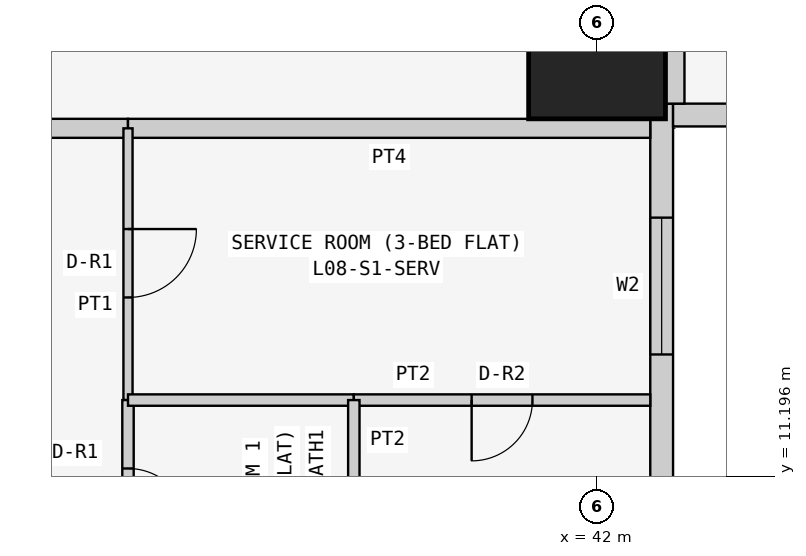
"""IFC4 building model, lengths in metres.
Left out: names, types, materials, properties, quantities, classifications, styles, units other than length and angle.
Written with IfcOpenShell. Run it as: python <this file> out.ifc"""

import sys

from ifc_helpers import new_model, si_unit, direction, frame, frame_2d, origin, origin_2d, place, context, subcontext, project, spatial, rectangle, extrude, element, fill, save


model = new_model("IFC4")
c1 = context("Model", 3, precision=1e-05, world=origin(), true_north=direction((0.0, 1.0)))
c2 = subcontext(c1, "Body", "Model", "MODEL_VIEW")
j1 = project(units=[si_unit("LENGTHUNIT", "METRE"), si_unit("PLANEANGLEUNIT", "RADIAN")], contexts=[c1])
p1 = place(None, origin())
s1 = spatial("IfcSite", under=j1, at=p1, CompositionType="ELEMENT")
p2 = place(p1, origin())
s2 = spatial("IfcBuilding", under=s1, at=p2, CompositionType="ELEMENT")
p3 = place(p2, frame((0.0, 0.0, 38.1)))
s3 = spatial("IfcBuildingStorey", under=s2, at=p3, CompositionType="ELEMENT", Elevation=38.1)
p4 = place(p3, frame((42.0, 16.8, 0.0), z_axis=(0.0, 0.0, 1.0), x_axis=(1.0, 0.0, 0.0)))
e1 = element("IfcColumn", 1, at=p4, inside=s3, PredefinedType="COLUMN", context=c2, shape_type="SweptSolid", body=[
    extrude(rectangle(XDim=1.8, YDim=1.8, at=origin_2d()), origin(), (0.0, 0.0, 1.0), 3.6),
])
p5 = place(p3, frame((42.85, 0.4, 0.0), z_axis=(0.0, 0.0, 1.0), x_axis=(0.0, 1.0, 0.0)))
e2 = element("IfcWall", 2, at=p5, inside=s3, PredefinedType="SOLIDWALL", context=c2, shape_type="SweptSolid", body=[
    extrude(rectangle(XDim=15.7, YDim=0.3, at=frame_2d((7.85, 0.0))), origin(), (0.0, 0.0, 1.0), 3.45),
])
p6 = place(p5, frame((12.4, 0.0, 0.9)))
e3 = element("IfcOpeningElement", 3, at=p6, cuts=e2, PredefinedType="OPENING", context=c2, shape_type="SweptSolid", body=[
    extrude(rectangle(XDim=1.8, YDim=1.5, at=frame_2d((0.9, 0.75))), frame((0.0, 0.16, 0.0), z_axis=(0.0, -1.0, 0.0), x_axis=(1.0, 0.0, 0.0)), (0.0, 0.0, 1.0), 0.32),
])
p7 = place(p5, frame((9.55, 0.0, 1.5)))
e4 = element("IfcOpeningElement", 4, at=p7, cuts=e2, PredefinedType="OPENING", context=c2, shape_type="SweptSolid", body=[
    extrude(rectangle(XDim=0.9, YDim=0.7, at=frame_2d((0.45, 0.35))), frame((0.0, 0.16, 0.0), z_axis=(0.0, -1.0, 0.0), x_axis=(1.0, 0.0, 0.0)), (0.0, 0.0, 1.0), 0.32),
])
p8 = place(p5, frame((5.1, 0.0, 0.9)))
e5 = element("IfcOpeningElement", 5, at=p8, cuts=e2, PredefinedType="OPENING", context=c2, shape_type="SweptSolid", body=[
    extrude(rectangle(XDim=1.8, YDim=1.5, at=frame_2d((0.9, 0.75))), frame((0.0, 0.16, 0.0), z_axis=(0.0, -1.0, 0.0), x_axis=(1.0, 0.0, 0.0)), (0.0, 0.0, 1.0), 0.32),
])
p9 = place(p5, frame((2.0, 0.0, 0.0)))
e6 = element("IfcOpeningElement", 6, at=p9, cuts=e2, PredefinedType="OPENING", context=c2, shape_type="SweptSolid", body=[
    extrude(rectangle(XDim=0.9, YDim=2.4, at=frame_2d((0.45, 1.2))), frame((0.0, 0.16, 0.0), z_axis=(0.0, -1.0, 0.0), x_axis=(1.0, 0.0, 0.0)), (0.0, 0.0, 1.0), 0.32),
])
p10 = place(p5, frame((0.7, 0.0, 0.9)))
e7 = element("IfcOpeningElement", 7, at=p10, cuts=e2, PredefinedType="OPENING", context=c2, shape_type="SweptSolid", body=[
    extrude(rectangle(XDim=1.2, YDim=1.5, at=frame_2d((0.6, 0.75))), frame((0.0, 0.16, 0.0), z_axis=(0.0, -1.0, 0.0), x_axis=(1.0, 0.0, 0.0)), (0.0, 0.0, 1.0), 0.32),
])
p11 = place(p3, frame((43.0, 15.95, 0.0), z_axis=(0.0, 0.0, 1.0), x_axis=(1.0, 0.0, 0.0)))
e8 = element("IfcWall", 8, at=p11, inside=s3, PredefinedType="SOLIDWALL", context=c2, shape_type="SweptSolid", body=[
    extrude(rectangle(XDim=15.4, YDim=0.3, at=frame_2d((7.7, 0.0))), origin(), (0.0, 0.0, 1.0), 3.45),
])
p12 = place(p11, frame((1.2, 0.0, 0.9)))
e9 = element("IfcOpeningElement", 9, at=p12, cuts=e8, PredefinedType="OPENING", context=c2, shape_type="SweptSolid", body=[
    extrude(rectangle(XDim=1.8, YDim=1.5, at=frame_2d((0.9, 0.75))), frame((0.0, 0.16, 0.0), z_axis=(0.0, -1.0, 0.0), x_axis=(1.0, 0.0, 0.0)), (0.0, 0.0, 1.0), 0.32),
])
p13 = place(p11, frame((4.95, 0.0, 1.5)))
e10 = element("IfcOpeningElement", 10, at=p13, cuts=e8, PredefinedType="OPENING", context=c2, shape_type="SweptSolid", body=[
    extrude(rectangle(XDim=0.9, YDim=0.7, at=frame_2d((0.45, 0.35))), frame((0.0, 0.16, 0.0), z_axis=(0.0, -1.0, 0.0), x_axis=(1.0, 0.0, 0.0)), (0.0, 0.0, 1.0), 0.32),
])
p14 = place(p11, frame((8.5, 0.0, 0.9)))
e11 = element("IfcOpeningElement", 11, at=p14, cuts=e8, PredefinedType="OPENING", context=c2, shape_type="SweptSolid", body=[
    extrude(rectangle(XDim=1.8, YDim=1.5, at=frame_2d((0.9, 0.75))), frame((0.0, 0.16, 0.0), z_axis=(0.0, -1.0, 0.0), x_axis=(1.0, 0.0, 0.0)), (0.0, 0.0, 1.0), 0.32),
])
p15 = place(p11, frame((12.5, 0.0, 0.0)))
e12 = element("IfcOpeningElement", 12, at=p15, cuts=e8, PredefinedType="OPENING", context=c2, shape_type="SweptSolid", body=[
    extrude(rectangle(XDim=0.9, YDim=2.4, at=frame_2d((0.45, 1.2))), frame((0.0, 0.16, 0.0), z_axis=(0.0, -1.0, 0.0), x_axis=(1.0, 0.0, 0.0)), (0.0, 0.0, 1.0), 0.32),
])
p16 = place(p11, frame((13.5, 0.0, 0.9)))
e13 = element("IfcOpeningElement", 13, at=p16, cuts=e8, PredefinedType="OPENING", context=c2, shape_type="SweptSolid", body=[
    extrude(rectangle(XDim=1.2, YDim=1.5, at=frame_2d((0.6, 0.75))), frame((0.0, 0.16, 0.0), z_axis=(0.0, -1.0, 0.0), x_axis=(1.0, 0.0, 0.0)), (0.0, 0.0, 1.0), 0.32),
])
p17 = place(p3, frame((43.025, 22.971, 0.0), z_axis=(0.0, 0.0, 1.0), x_axis=(0.0, -1.0, 0.0)))
e14 = element("IfcWall", 14, at=p17, inside=s3, PredefinedType="PARTITIONING", context=c2, shape_type="SweptSolid", body=[
    extrude(rectangle(XDim=6.871, YDim=0.25, at=frame_2d((3.436, 0.0))), origin(), (0.0, 0.0, 1.0), 3.45),
])
p18 = place(p3, frame((35.829, 15.775, 0.0), z_axis=(0.0, 0.0, 1.0), x_axis=(-1.0, 0.0, 0.0)))
e15 = element("IfcWall", 15, at=p18, inside=s3, PredefinedType="PARTITIONING", context=c2, shape_type="SweptSolid", body=[
    extrude(rectangle(XDim=1.2, YDim=0.25, at=frame_2d((0.6, 0.0))), origin(), (0.0, 0.0, 1.0), 3.45),
])
p19 = place(p3, frame((42.7, 15.775, 0.0), z_axis=(0.0, 0.0, 1.0), x_axis=(-1.0, 0.0, 0.0)))
e16 = element("IfcWall", 16, at=p19, inside=s3, PredefinedType="PARTITIONING", context=c2, shape_type="SweptSolid", body=[
    extrude(rectangle(XDim=6.871, YDim=0.25, at=frame_2d((3.436, 0.0))), origin(), (0.0, 0.0, 1.0), 3.45),
])
p20 = place(p3, frame((35.829, 12.2, 0.0), z_axis=(0.0, 0.0, 1.0), x_axis=(0.0, 1.0, 0.0)))
e17 = element("IfcWall", 17, at=p20, inside=s3, PredefinedType="PARTITIONING", context=c2, shape_type="SweptSolid", body=[
    extrude(rectangle(XDim=3.575, YDim=0.12, at=frame_2d((1.788, 0.0))), origin(), (0.0, 0.0, 1.0), 3.45),
])
p21 = place(p20, frame((1.35, 0.0, 0.0)))
e18 = element("IfcOpeningElement", 18, at=p21, cuts=e17, PredefinedType="OPENING", context=c2, shape_type="SweptSolid", body=[
    extrude(rectangle(XDim=0.9, YDim=2.1, at=frame_2d((0.45, 1.05))), frame((0.0, 0.07, 0.0), z_axis=(0.0, -1.0, 0.0), x_axis=(1.0, 0.0, 0.0)), (0.0, 0.0, 1.0), 0.14),
])
p22 = place(p3, frame((35.829, 9.6, 0.0), z_axis=(0.0, 0.0, 1.0), x_axis=(0.0, 1.0, 0.0)))
e19 = element("IfcWall", 19, at=p22, inside=s3, PredefinedType="PARTITIONING", context=c2, shape_type="SweptSolid", body=[
    extrude(rectangle(XDim=2.6, YDim=0.15, at=frame_2d((1.3, 0.0))), origin(), (0.0, 0.0, 1.0), 3.45),
])
p23 = place(p22, frame((0.9, 0.0, 0.0)))
e20 = element("IfcOpeningElement", 20, at=p23, cuts=e19, PredefinedType="OPENING", context=c2, shape_type="SweptSolid", body=[
    extrude(rectangle(XDim=0.8, YDim=2.1, at=frame_2d((0.4, 1.05))), frame((0.0, 0.085, 0.0), z_axis=(0.0, -1.0, 0.0), x_axis=(1.0, 0.0, 0.0)), (0.0, 0.0, 1.0), 0.17),
])
p24 = place(p3, frame((35.829, 12.2, 0.0), z_axis=(0.0, 0.0, 1.0), x_axis=(1.0, 0.0, 0.0)))
e21 = element("IfcWall", 21, at=p24, inside=s3, PredefinedType="PARTITIONING", context=c2, shape_type="SweptSolid", body=[
    extrude(rectangle(XDim=2.971, YDim=0.15, at=frame_2d((1.485, 0.0))), origin(), (0.0, 0.0, 1.0), 3.45),
])
p25 = place(p3, frame((38.8, 12.2, 0.0), z_axis=(0.0, 0.0, 1.0), x_axis=(1.0, 0.0, 0.0)))
e22 = element("IfcWall", 22, at=p25, inside=s3, PredefinedType="PARTITIONING", context=c2, shape_type="SweptSolid", body=[
    extrude(rectangle(XDim=3.9, YDim=0.15, at=frame_2d((1.95, 0.0))), origin(), (0.0, 0.0, 1.0), 3.45),
])
p26 = place(p25, frame((1.55, 0.0, 0.0)))
e23 = element("IfcOpeningElement", 23, at=p26, cuts=e22, PredefinedType="OPENING", context=c2, shape_type="SweptSolid", body=[
    extrude(rectangle(XDim=0.8, YDim=2.1, at=frame_2d((0.4, 1.05))), frame((0.0, 0.085, 0.0), z_axis=(0.0, -1.0, 0.0), x_axis=(1.0, 0.0, 0.0)), (0.0, 0.0, 1.0), 0.17),
])
p27 = place(p3, frame((38.8, 9.6, 0.0), z_axis=(0.0, 0.0, 1.0), x_axis=(0.0, 1.0, 0.0)))
e24 = element("IfcWall", 24, at=p27, inside=s3, PredefinedType="PARTITIONING", context=c2, shape_type="SweptSolid", body=[
    extrude(rectangle(XDim=2.6, YDim=0.15, at=frame_2d((1.3, 0.0))), origin(), (0.0, 0.0, 1.0), 3.45),
])
p28 = place(p6, origin())
e25 = element("IfcWindow", 25, at=p28, inside=s3, PartitioningType="SINGLE_PANEL", PredefinedType="WINDOW", context=c2, shape_type="SweptSolid", body=[
    extrude(rectangle(XDim=1.8, YDim=1.5, at=frame_2d((0.9, 0.75))), frame((0.0, 0.03, 0.0), z_axis=(0.0, -1.0, 0.0), x_axis=(1.0, 0.0, 0.0)), (0.0, 0.0, 1.0), 0.06),
])
fill(e3, e25)
p29 = place(p21, frame((0.9, 0.0, 0.0), z_axis=(0.0, 0.0, 1.0), x_axis=(-1.0, 0.0, 0.0)))
e26 = element("IfcDoor", 26, at=p29, inside=s3, OperationType="SINGLE_SWING_LEFT", PredefinedType="DOOR", context=c2, shape_type="SweptSolid", body=[
    extrude(rectangle(XDim=0.9, YDim=2.1, at=frame_2d((0.45, 1.05))), frame((0.0, 0.025, 0.0), z_axis=(0.0, -1.0, 0.0), x_axis=(1.0, 0.0, 0.0)), (0.0, 0.0, 1.0), 0.05),
])
fill(e18, e26)
p30 = place(p26, frame((0.8, 0.0, 0.0), z_axis=(0.0, 0.0, 1.0), x_axis=(-1.0, 0.0, 0.0)))
e27 = element("IfcDoor", 27, at=p30, inside=s3, OperationType="SINGLE_SWING_RIGHT", PredefinedType="DOOR", context=c2, shape_type="SweptSolid", body=[
    extrude(rectangle(XDim=0.8, YDim=2.1, at=frame_2d((0.4, 1.05))), frame((0.0, 0.025, 0.0), z_axis=(0.0, -1.0, 0.0), x_axis=(1.0, 0.0, 0.0)), (0.0, 0.0, 1.0), 0.05),
])
fill(e23, e27)
p31 = place(p23, frame((0.8, 0.0, 0.0), z_axis=(0.0, 0.0, 1.0), x_axis=(-1.0, 0.0, 0.0)))
e28 = element("IfcDoor", 28, at=p31, inside=s3, OperationType="SINGLE_SWING_RIGHT", PredefinedType="DOOR", context=c2, shape_type="SweptSolid", body=[
    extrude(rectangle(XDim=0.8, YDim=2.1, at=frame_2d((0.4, 1.05))), frame((0.0, 0.025, 0.0), z_axis=(0.0, -1.0, 0.0), x_axis=(1.0, 0.0, 0.0)), (0.0, 0.0, 1.0), 0.05),
])
fill(e20, e28)
save(model, sys.argv[1])
